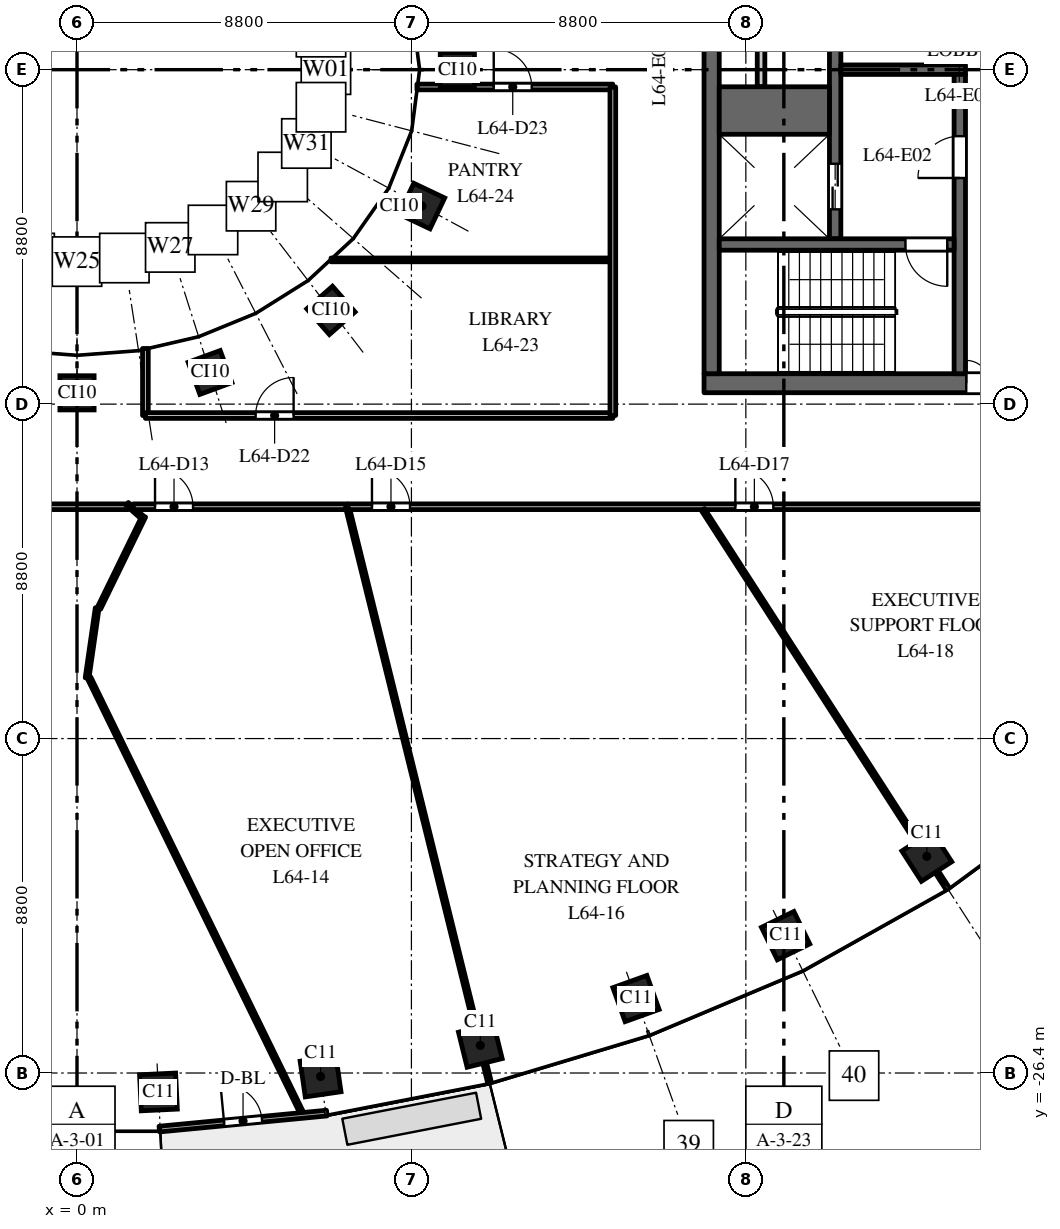
"""IFC4 building model, lengths in metres.
Left out: names, types, materials, properties, quantities, classifications, styles, units other than length and angle.
Written with IfcOpenShell. Run it as: python <this file> out.ifc"""

import sys

from ifc_helpers import new_model, si_unit, direction, frame, frame_2d, origin, origin_2d, place, context, subcontext, project, spatial, rectangle, extrude, element, fill, save


model = new_model("IFC4")
c1 = context("Model", 3, precision=1e-05, world=origin(), true_north=direction((0.0, 1.0)))
c2 = subcontext(c1, "Body", "Model", "MODEL_VIEW")
j1 = project(units=[si_unit("LENGTHUNIT", "METRE"), si_unit("PLANEANGLEUNIT", "RADIAN")], contexts=[c1])
p1 = place(None, origin())
s1 = spatial("IfcSite", under=j1, at=p1, CompositionType="ELEMENT")
p2 = place(p1, origin())
s2 = spatial("IfcBuilding", under=s1, at=p2, CompositionType="ELEMENT")
p3 = place(p2, frame((0.0, 0.0, 299.0)))
s3 = spatial("IfcBuildingStorey", under=s2, at=p3, CompositionType="ELEMENT", Elevation=299.0)
for number, where, z_axis, x_axis in (
    (1, (2.143, -26.898, 0.0), (0.0, 0.0, 1.0), (0.999, 0.048, 0.0)),
    (2, (6.409, -26.491, 0.0), (0.0, 0.0, 1.0), (0.99, 0.143, 0.0)),
    (3, (10.613, -25.674, 0.0), (0.0, 0.0, 1.0), (0.971, 0.24, 0.0)),
    (4, (14.709, -24.441, 0.0), (0.0, 0.0, 1.0), (0.941, 0.338, 0.0)),
    (5, (18.646, -22.785, 0.0), (0.0, 0.0, 1.0), (0.898, 0.439, 0.0)),
    (6, (22.362, -20.7, 0.0), (0.0, 0.0, 1.0), (0.84, 0.542, 0.0)),
):
    element("IfcColumn", number, at=place(p3, frame(where, z_axis=z_axis, x_axis=x_axis)), inside=s3, PredefinedType="COLUMN", context=c2, shape_type="SweptSolid", body=[
        extrude(rectangle(XDim=0.95, YDim=0.95, at=origin_2d()), origin(), (0.0, 0.0, 1.0), 4.0),
    ])
for number, where, z_axis, x_axis in (
    (7, (10.008, 0.0, 0.0), (0.0, 0.0, 1.0), (0.0, 1.0, 0.0)),
    (8, (0.0, -8.503, 0.0), (0.0, 0.0, 1.0), (1.0, 0.0, 0.0)),
    (9, (3.501, -7.967, 0.0), (0.0, 0.0, 1.0), (0.939, 0.344, 0.0)),
    (10, (6.682, -6.334, 0.0), (0.0, 0.0, 1.0), (0.751, 0.66, 0.0)),
    (11, (9.076, -3.588, 0.0), (0.0, 0.0, 1.0), (0.429, 0.903, 0.0)),
):
    element("IfcColumn", number, at=place(p3, frame(where, z_axis=z_axis, x_axis=x_axis)), inside=s3, PredefinedType="COLUMN", context=c2, shape_type="SweptSolid", body=[
        extrude(rectangle(XDim=0.9, YDim=0.9, at=origin_2d()), origin(), (0.0, 0.0, 1.0), 4.0),
    ])
p4 = place(p3, frame((16.5, -8.25, 0.0), z_axis=(0.0, 0.0, 1.0), x_axis=(1.0, 0.0, 0.0)))
e12 = element("IfcWall", 12, at=p4, inside=s3, PredefinedType="SHEAR", context=c2, shape_type="SweptSolid", body=[
    extrude(rectangle(XDim=15.0, YDim=0.5, at=frame_2d((7.5, 0.0))), origin(), (0.0, 0.0, 1.0), 3.7),
])
p5 = place(p4, frame((6.9, 0.0, 0.0)))
e13 = element("IfcOpeningElement", 13, at=p5, cuts=e12, PredefinedType="OPENING", context=c2, shape_type="SweptSolid", body=[
    extrude(rectangle(XDim=1.2, YDim=2.1, at=frame_2d((0.6, 1.05))), frame((0.0, 0.26, 0.0), z_axis=(0.0, -1.0, 0.0), x_axis=(1.0, 0.0, 0.0)), (0.0, 0.0, 1.0), 0.52),
])
p6 = place(p4, frame((12.05, 0.0, 0.0)))
e14 = element("IfcOpeningElement", 14, at=p6, cuts=e12, PredefinedType="OPENING", context=c2, shape_type="SweptSolid", body=[
    extrude(rectangle(XDim=0.9, YDim=2.1, at=frame_2d((0.45, 1.05))), frame((0.0, 0.26, 0.0), z_axis=(0.0, -1.0, 0.0), x_axis=(1.0, 0.0, 0.0)), (0.0, 0.0, 1.0), 0.52),
])
p7 = place(p3, frame((18.0, -0.45, 0.0), z_axis=(0.0, 0.0, 1.0), x_axis=(0.0, 1.0, 0.0)))
e15 = element("IfcWall", 15, at=p7, inside=s3, PredefinedType="PARTITIONING", context=c2, shape_type="SweptSolid", body=[
    extrude(rectangle(XDim=4.9, YDim=0.2, at=frame_2d((2.45, 0.0))), origin(), (0.0, 0.0, 1.0), 3.7),
])
p8 = place(p7, frame((2.0, 0.0, 0.0)))
e16 = element("IfcOpeningElement", 16, at=p8, cuts=e15, PredefinedType="OPENING", context=c2, shape_type="SweptSolid", body=[
    extrude(rectangle(XDim=0.9, YDim=2.1, at=frame_2d((0.45, 1.05))), frame((0.0, 0.11, 0.0), z_axis=(0.0, -1.0, 0.0), x_axis=(1.0, 0.0, 0.0)), (0.0, 0.0, 1.0), 0.22),
])
p9 = place(p3, frame((19.95, -4.45, 0.0), z_axis=(0.0, 0.0, 1.0), x_axis=(0.0, 1.0, 0.0)))
e17 = element("IfcWall", 17, at=p9, inside=s3, PredefinedType="SHEAR", context=c2, shape_type="SweptSolid", body=[
    extrude(rectangle(XDim=8.9, YDim=0.3, at=frame_2d((4.45, 0.0))), origin(), (0.0, 0.0, 1.0), 3.7),
])
p10 = place(p9, frame((0.775, 0.0, 0.0)))
e18 = element("IfcOpeningElement", 18, at=p10, cuts=e17, PredefinedType="OPENING", context=c2, shape_type="SweptSolid", body=[
    extrude(rectangle(XDim=1.2, YDim=2.1, at=frame_2d((0.6, 1.05))), frame((0.0, 0.16, 0.0), z_axis=(0.0, -1.0, 0.0), x_axis=(1.0, 0.0, 0.0)), (0.0, 0.0, 1.0), 0.32),
])
p11 = place(p9, frame((6.0, 0.0, 0.0)))
e19 = element("IfcOpeningElement", 19, at=p11, cuts=e17, PredefinedType="OPENING", context=c2, shape_type="SweptSolid", body=[
    extrude(rectangle(XDim=0.9, YDim=2.1, at=frame_2d((0.45, 1.05))), frame((0.0, 0.16, 0.0), z_axis=(0.0, -1.0, 0.0), x_axis=(1.0, 0.0, 0.0)), (0.0, 0.0, 1.0), 0.32),
])
p12 = place(p3, frame((20.1, 0.0, 0.0), z_axis=(0.0, 0.0, 1.0), x_axis=(1.0, 0.0, 0.0)))
e20 = element("IfcWall", 20, at=p12, inside=s3, PredefinedType="SHEAR", context=c2, shape_type="SweptSolid", body=[
    extrude(rectangle(XDim=3.28, YDim=0.25, at=frame_2d((1.64, 0.0))), origin(), (0.0, 0.0, 1.0), 3.7),
])
p13 = place(p3, frame((16.7, -8.0, 0.0), z_axis=(0.0, 0.0, 1.0), x_axis=(0.0, 1.0, 0.0)))
e21 = element("IfcWall", 21, at=p13, inside=s3, PredefinedType="SHEAR", context=c2, shape_type="SweptSolid", body=[
    extrude(rectangle(XDim=16.0, YDim=0.4, at=frame_2d((8.0, 0.0))), origin(), (0.0, 0.0, 1.0), 3.7),
])
p14 = place(p3, frame((16.9, -1.075, 0.0), z_axis=(0.0, 0.0, 1.0), x_axis=(1.0, 0.0, 0.0)))
e22 = element("IfcWall", 22, at=p14, inside=s3, PredefinedType="SHEAR", context=c2, shape_type="SweptSolid", body=[
    extrude(rectangle(XDim=2.9, YDim=1.25, at=frame_2d((1.45, 0.0))), origin(), (0.0, 0.0, 1.0), 3.7),
])
p15 = place(p3, frame((23.23, -8.0, 0.0), z_axis=(0.0, 0.0, 1.0), x_axis=(0.0, 1.0, 0.0)))
e23 = element("IfcWall", 23, at=p15, inside=s3, PredefinedType="SHEAR", context=c2, shape_type="SweptSolid", body=[
    extrude(rectangle(XDim=7.875, YDim=0.3, at=frame_2d((3.938, 0.0))), origin(), (0.0, 0.0, 1.0), 3.7),
])
p16 = place(p15, frame((5.15, 0.0, 0.0)))
e24 = element("IfcOpeningElement", 24, at=p16, cuts=e23, PredefinedType="OPENING", context=c2, shape_type="SweptSolid", body=[
    extrude(rectangle(XDim=1.1, YDim=2.1, at=frame_2d((0.55, 1.05))), frame((0.0, 0.16, 0.0), z_axis=(0.0, -1.0, 0.0), x_axis=(1.0, 0.0, 0.0)), (0.0, 0.0, 1.0), 0.32),
])
p17 = place(p3, frame((16.9, -4.6, 0.0), z_axis=(0.0, 0.0, 1.0), x_axis=(1.0, 0.0, 0.0)))
e25 = element("IfcWall", 25, at=p17, inside=s3, PredefinedType="SHEAR", context=c2, shape_type="SweptSolid", body=[
    extrude(rectangle(XDim=6.18, YDim=0.3, at=frame_2d((3.09, 0.0))), origin(), (0.0, 0.0, 1.0), 3.7),
])
p18 = place(p17, frame((4.9, 0.0, 0.0)))
e26 = element("IfcOpeningElement", 26, at=p18, cuts=e25, PredefinedType="OPENING", context=c2, shape_type="SweptSolid", body=[
    extrude(rectangle(XDim=1.1, YDim=2.1, at=frame_2d((0.55, 1.05))), frame((0.0, 0.16, 0.0), z_axis=(0.0, -1.0, 0.0), x_axis=(1.0, 0.0, 0.0)), (0.0, 0.0, 1.0), 0.32),
])
p19 = place(p3, frame((2.166, -27.875, 0.0), z_axis=(0.0, 0.0, 1.0), x_axis=(0.995473879823, 0.095035543824, 0.0)))
e27 = element("IfcWall", 27, at=p19, inside=s3, PredefinedType="STANDARD", context=c2, shape_type="SweptSolid", body=[
    extrude(rectangle(XDim=4.426, YDim=0.15, at=frame_2d((2.213, 0.0))), origin(), (0.0, 0.0, 1.0), 3.7),
])
p20 = place(p19, frame((1.713, 0.0, 0.0)))
e28 = element("IfcOpeningElement", 28, at=p20, cuts=e27, PredefinedType="OPENING", context=c2, shape_type="SweptSolid", body=[
    extrude(rectangle(XDim=1.0, YDim=2.4, at=frame_2d((0.5, 1.2))), frame((0.0, 0.085, 0.0), z_axis=(0.0, -1.0, 0.0), x_axis=(1.0, 0.0, 0.0)), (0.0, 0.0, 1.0), 0.17),
])
p21 = place(p3, frame((-1.488, -11.5, 0.0), z_axis=(0.0, 0.0, 1.0), x_axis=(1.0, 0.0, 0.0)))
e29 = element("IfcWall", 29, at=p21, inside=s3, PredefinedType="PARTITIONING", context=c2, shape_type="SweptSolid", body=[
    extrude(rectangle(XDim=2.841, YDim=0.15, at=frame_2d((1.42, 0.0))), origin(), (0.0, 0.0, 1.0), 2.85),
])
p22 = place(p3, frame((0.265, -16.008, 0.0), z_axis=(0.0, 0.0, 1.0), x_axis=(0.142907964002, 0.989735981878, 0.0)))
e30 = element("IfcWall", 30, at=p22, inside=s3, PredefinedType="PARTITIONING", context=c2, shape_type="SweptSolid", body=[
    extrude(rectangle(XDim=1.862, YDim=0.1, at=frame_2d((0.931, 0.0))), origin(), (0.0, 0.0, 1.0), 3.7),
])
p23 = place(p3, frame((0.317, -16.0, 0.0), z_axis=(0.0, 0.0, 1.0), x_axis=(0.43922717886, -0.898376026701, 0.0)))
e31 = element("IfcWall", 31, at=p23, inside=s3, PredefinedType="PARTITIONING", context=c2, shape_type="SweptSolid", body=[
    extrude(rectangle(XDim=12.843, YDim=0.1, at=frame_2d((6.422, 0.0))), origin(), (0.0, 0.0, 1.0), 3.0),
])
p24 = place(p3, frame((0.577, -14.173, 0.0), z_axis=(0.0, 0.0, 1.0), x_axis=(0.43904776377, 0.898463722767, 0.0)))
e32 = element("IfcWall", 32, at=p24, inside=s3, PredefinedType="PARTITIONING", context=c2, shape_type="SweptSolid", body=[
    extrude(rectangle(XDim=2.697, YDim=0.1, at=frame_2d((1.349, 0.0))), origin(), (0.0, 0.0, 1.0), 3.7),
])
p25 = place(p3, frame((1.318, -11.425, 0.0), z_axis=(0.0, 0.0, 1.0), x_axis=(0.748043921786, -0.663649222918, 0.0)))
e33 = element("IfcWall", 33, at=p25, inside=s3, PredefinedType="PARTITIONING", context=c2, shape_type="SweptSolid", body=[
    extrude(rectangle(XDim=0.509, YDim=0.1, at=frame_2d((0.254, 0.0))), origin(), (0.0, 0.0, 1.0), 3.7),
])
p26 = place(p3, frame((1.478, -11.5, 0.0), z_axis=(0.0, 0.0, 1.0), x_axis=(1.0, 0.0, 0.0)))
e34 = element("IfcWall", 34, at=p26, inside=s3, PredefinedType="PARTITIONING", context=c2, shape_type="SweptSolid", body=[
    extrude(rectangle(XDim=5.634, YDim=0.15, at=frame_2d((2.817, 0.0))), origin(), (0.0, 0.0, 1.0), 2.85),
])
p27 = place(p26, frame((0.575, 0.0, 0.0)))
e35 = element("IfcOpeningElement", 35, at=p27, cuts=e34, PredefinedType="OPENING", context=c2, shape_type="SweptSolid", body=[
    extrude(rectangle(XDim=1.0, YDim=2.1, at=frame_2d((0.5, 1.05))), frame((0.0, 0.085, 0.0), z_axis=(0.0, -1.0, 0.0), x_axis=(1.0, 0.0, 0.0)), (0.0, 0.0, 1.0), 0.17),
])
p28 = place(p3, frame((1.8, -9.1, 0.0), z_axis=(0.0, 0.0, 1.0), x_axis=(0.0, 1.0, 0.0)))
e36 = element("IfcWall", 36, at=p28, inside=s3, PredefinedType="PARTITIONING", context=c2, shape_type="SweptSolid", body=[
    extrude(rectangle(XDim=1.764, YDim=0.15, at=frame_2d((0.882, 0.0))), origin(), (0.0, 0.0, 1.0), 3.0),
])
p29 = place(p3, frame((1.8, -9.1, 0.0), z_axis=(0.0, 0.0, 1.0), x_axis=(1.0, 0.0, 0.0)))
e37 = element("IfcWall", 37, at=p29, inside=s3, PredefinedType="PARTITIONING", context=c2, shape_type="SweptSolid", body=[
    extrude(rectangle(XDim=12.3, YDim=0.15, at=frame_2d((6.15, 0.0))), origin(), (0.0, 0.0, 1.0), 2.85),
])
p30 = place(p29, frame((2.9, 0.0, 0.0)))
e38 = element("IfcOpeningElement", 38, at=p30, cuts=e37, PredefinedType="OPENING", context=c2, shape_type="SweptSolid", body=[
    extrude(rectangle(XDim=1.0, YDim=2.1, at=frame_2d((0.5, 1.05))), frame((0.0, 0.085, 0.0), z_axis=(0.0, -1.0, 0.0), x_axis=(1.0, 0.0, 0.0)), (0.0, 0.0, 1.0), 0.17),
])
p31 = place(p3, frame((6.684, -5.005, 0.0), z_axis=(0.0, 0.0, 1.0), x_axis=(1.0, 0.0, 0.0)))
e39 = element("IfcWall", 39, at=p31, inside=s3, PredefinedType="PARTITIONING", context=c2, shape_type="SweptSolid", body=[
    extrude(rectangle(XDim=7.341, YDim=0.1, at=frame_2d((3.67, 0.0))), origin(), (0.0, 0.0, 1.0), 2.75),
])
p32 = place(p3, frame((7.112, -11.5, 0.0), z_axis=(0.0, 0.0, 1.0), x_axis=(0.239846808941, -0.970810747901, 0.0)))
e40 = element("IfcWall", 40, at=p32, inside=s3, PredefinedType="PARTITIONING", context=c2, shape_type="SweptSolid", body=[
    extrude(rectangle(XDim=15.601, YDim=0.1, at=frame_2d((7.801, 0.0))), origin(), (0.0, 0.0, 1.0), 2.85),
])
p33 = place(p3, frame((7.129, -11.5, 0.0), z_axis=(0.0, 0.0, 1.0), x_axis=(1.0, 0.0, 0.0)))
e41 = element("IfcWall", 41, at=p33, inside=s3, PredefinedType="PARTITIONING", context=c2, shape_type="SweptSolid", body=[
    extrude(rectangle(XDim=24.371, YDim=0.15, at=frame_2d((12.186, 0.0))), origin(), (0.0, 0.0, 1.0), 2.75),
])
p34 = place(p33, frame((0.633, 0.0, 0.0)))
e42 = element("IfcOpeningElement", 42, at=p34, cuts=e41, PredefinedType="OPENING", context=c2, shape_type="SweptSolid", body=[
    extrude(rectangle(XDim=1.0, YDim=2.1, at=frame_2d((0.5, 1.05))), frame((0.0, 0.085, 0.0), z_axis=(0.0, -1.0, 0.0), x_axis=(1.0, 0.0, 0.0)), (0.0, 0.0, 1.0), 0.17),
])
p35 = place(p33, frame((10.195, 0.0, 0.0)))
e43 = element("IfcOpeningElement", 43, at=p35, cuts=e41, PredefinedType="OPENING", context=c2, shape_type="SweptSolid", body=[
    extrude(rectangle(XDim=1.0, YDim=2.1, at=frame_2d((0.5, 1.05))), frame((0.0, 0.085, 0.0), z_axis=(0.0, -1.0, 0.0), x_axis=(1.0, 0.0, 0.0)), (0.0, 0.0, 1.0), 0.17),
])
p36 = place(p3, frame((8.945, -0.455, 0.0), z_axis=(0.0, 0.0, 1.0), x_axis=(1.0, 0.0, 0.0)))
e44 = element("IfcWall", 44, at=p36, inside=s3, PredefinedType="PARTITIONING", context=c2, shape_type="SweptSolid", body=[
    extrude(rectangle(XDim=5.155, YDim=0.15, at=frame_2d((2.578, 0.0))), origin(), (0.0, 0.0, 1.0), 3.0),
])
p37 = place(p36, frame((2.021, 0.0, 0.0)))
e45 = element("IfcOpeningElement", 45, at=p37, cuts=e44, PredefinedType="OPENING", context=c2, shape_type="SweptSolid", body=[
    extrude(rectangle(XDim=1.0, YDim=2.1, at=frame_2d((0.5, 1.05))), frame((0.0, 0.085, 0.0), z_axis=(0.0, -1.0, 0.0), x_axis=(1.0, 0.0, 0.0)), (0.0, 0.0, 1.0), 0.17),
])
p38 = place(p3, frame((14.1, -9.1, 0.0), z_axis=(0.0, 0.0, 1.0), x_axis=(0.0, 1.0, 0.0)))
e46 = element("IfcWall", 46, at=p38, inside=s3, PredefinedType="PARTITIONING", context=c2, shape_type="SweptSolid", body=[
    extrude(rectangle(XDim=8.645, YDim=0.15, at=frame_2d((4.323, 0.0))), origin(), (0.0, 0.0, 1.0), 2.75),
])
p39 = place(p3, frame((16.472, -11.575, 0.0), z_axis=(0.0, 0.0, 1.0), x_axis=(0.54229092728, -0.840190782019, 0.0)))
e47 = element("IfcWall", 47, at=p39, inside=s3, PredefinedType="PARTITIONING", context=c2, shape_type="SweptSolid", body=[
    extrude(rectangle(XDim=11.863, YDim=0.1, at=frame_2d((5.931, 0.0))), origin(), (0.0, 0.0, 1.0), 3.7),
])
p40 = place(p10, origin())
e48 = element("IfcDoor", 48, at=p40, inside=s3, OperationType="DOUBLE_DOOR_SLIDING", PredefinedType="DOOR", context=c2, shape_type="SweptSolid", body=[
    extrude(rectangle(XDim=1.2, YDim=2.1, at=frame_2d((0.6, 1.05))), frame((0.0, 0.025, 0.0), z_axis=(0.0, -1.0, 0.0), x_axis=(1.0, 0.0, 0.0)), (0.0, 0.0, 1.0), 0.05),
])
fill(e18, e48)
p41 = place(p18, origin())
e49 = element("IfcDoor", 49, at=p41, inside=s3, OperationType="SINGLE_SWING_RIGHT", PredefinedType="DOOR", context=c2, shape_type="SweptSolid", body=[
    extrude(rectangle(XDim=1.1, YDim=2.1, at=frame_2d((0.55, 1.05))), frame((0.0, 0.025, 0.0), z_axis=(0.0, -1.0, 0.0), x_axis=(1.0, 0.0, 0.0)), (0.0, 0.0, 1.0), 0.05),
])
fill(e26, e49)
p42 = place(p16, origin())
e50 = element("IfcDoor", 50, at=p42, inside=s3, OperationType="SINGLE_SWING_RIGHT", PredefinedType="DOOR", context=c2, shape_type="SweptSolid", body=[
    extrude(rectangle(XDim=1.1, YDim=2.1, at=frame_2d((0.55, 1.05))), frame((0.0, 0.025, 0.0), z_axis=(0.0, -1.0, 0.0), x_axis=(1.0, 0.0, 0.0)), (0.0, 0.0, 1.0), 0.05),
])
fill(e24, e50)
p43 = place(p5, origin())
e51 = element("IfcDoor", 51, at=p43, inside=s3, OperationType="DOUBLE_DOOR_DOUBLE_SWING", PredefinedType="DOOR", context=c2, shape_type="SweptSolid", body=[
    extrude(rectangle(XDim=1.2, YDim=2.1, at=frame_2d((0.6, 1.05))), frame((0.0, 0.025, 0.0), z_axis=(0.0, -1.0, 0.0), x_axis=(1.0, 0.0, 0.0)), (0.0, 0.0, 1.0), 0.05),
])
fill(e13, e51)
p44 = place(p20, origin())
e52 = element("IfcDoor", 52, at=p44, inside=s3, OperationType="SINGLE_SWING_LEFT", PredefinedType="DOOR", context=c2, shape_type="SweptSolid", body=[
    extrude(rectangle(XDim=1.0, YDim=2.4, at=frame_2d((0.5, 1.2))), frame((0.0, 0.025, 0.0), z_axis=(0.0, -1.0, 0.0), x_axis=(1.0, 0.0, 0.0)), (0.0, 0.0, 1.0), 0.05),
])
fill(e28, e52)
p45 = place(p27, origin())
e53 = element("IfcDoor", 53, at=p45, inside=s3, OperationType="SINGLE_SWING_LEFT", PredefinedType="DOOR", context=c2, shape_type="SweptSolid", body=[
    extrude(rectangle(XDim=1.0, YDim=2.1, at=frame_2d((0.5, 1.05))), frame((0.0, 0.025, 0.0), z_axis=(0.0, -1.0, 0.0), x_axis=(1.0, 0.0, 0.0)), (0.0, 0.0, 1.0), 0.05),
])
fill(e35, e53)
p46 = place(p34, origin())
e54 = element("IfcDoor", 54, at=p46, inside=s3, OperationType="SINGLE_SWING_LEFT", PredefinedType="DOOR", context=c2, shape_type="SweptSolid", body=[
    extrude(rectangle(XDim=1.0, YDim=2.1, at=frame_2d((0.5, 1.05))), frame((0.0, 0.025, 0.0), z_axis=(0.0, -1.0, 0.0), x_axis=(1.0, 0.0, 0.0)), (0.0, 0.0, 1.0), 0.05),
])
fill(e42, e54)
p47 = place(p35, origin())
e55 = element("IfcDoor", 55, at=p47, inside=s3, OperationType="SINGLE_SWING_LEFT", PredefinedType="DOOR", context=c2, shape_type="SweptSolid", body=[
    extrude(rectangle(XDim=1.0, YDim=2.1, at=frame_2d((0.5, 1.05))), frame((0.0, 0.025, 0.0), z_axis=(0.0, -1.0, 0.0), x_axis=(1.0, 0.0, 0.0)), (0.0, 0.0, 1.0), 0.05),
])
fill(e43, e55)
p48 = place(p30, origin())
e56 = element("IfcDoor", 56, at=p48, inside=s3, OperationType="SINGLE_SWING_RIGHT", PredefinedType="DOOR", context=c2, shape_type="SweptSolid", body=[
    extrude(rectangle(XDim=1.0, YDim=2.1, at=frame_2d((0.5, 1.05))), frame((0.0, 0.025, 0.0), z_axis=(0.0, -1.0, 0.0), x_axis=(1.0, 0.0, 0.0)), (0.0, 0.0, 1.0), 0.05),
])
fill(e38, e56)
p49 = place(p37, origin())
e57 = element("IfcDoor", 57, at=p49, inside=s3, OperationType="SINGLE_SWING_LEFT", PredefinedType="DOOR", context=c2, shape_type="SweptSolid", body=[
    extrude(rectangle(XDim=1.0, YDim=2.1, at=frame_2d((0.5, 1.05))), frame((0.0, 0.025, 0.0), z_axis=(0.0, -1.0, 0.0), x_axis=(1.0, 0.0, 0.0)), (0.0, 0.0, 1.0), 0.05),
])
fill(e45, e57)
save(model, sys.argv[1])
